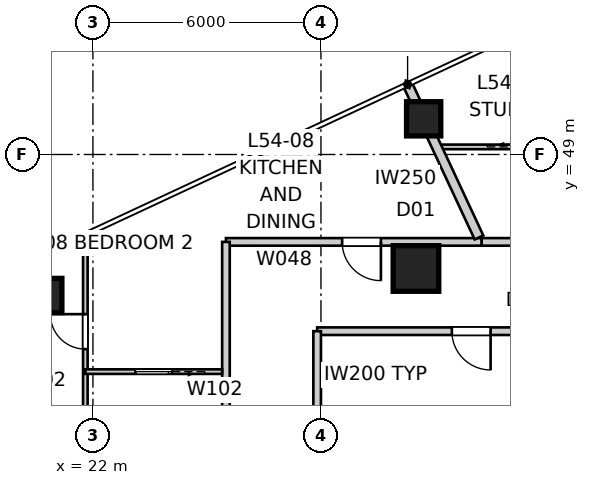
"""IFC4 building model, lengths in metres.
Left out: names, types, materials, properties, quantities, classifications, styles, units other than length and angle.
Written with IfcOpenShell. Run it as: python <this file> out.ifc"""

import sys

from ifc_helpers import new_model, si_unit, direction, frame, frame_2d, origin, origin_2d, place, context, subcontext, project, spatial, rectangle, extrude, element, fill, save


model = new_model("IFC4")
c1 = context("Model", 3, precision=1e-05, world=origin(), true_north=direction((0.0, 1.0)))
c2 = subcontext(c1, "Body", "Model", "MODEL_VIEW")
j1 = project(units=[si_unit("LENGTHUNIT", "METRE"), si_unit("PLANEANGLEUNIT", "RADIAN")], contexts=[c1])
p1 = place(None, origin())
s1 = spatial("IfcSite", under=j1, at=p1, CompositionType="ELEMENT")
p2 = place(p1, origin())
s2 = spatial("IfcBuilding", under=s1, at=p2, CompositionType="ELEMENT")
p3 = place(p2, frame((0.0, 0.0, 196.4)))
s3 = spatial("IfcBuildingStorey", under=s2, at=p3, CompositionType="ELEMENT", Elevation=196.4)
for number, where, z_axis, x_axis in (
    (1, (30.702, 49.939, 0.0), (0.0, 0.0, 1.0), (1.0, 0.0, 0.0)),
    (2, (20.733, 45.29, 0.0), (0.0, 0.0, 1.0), (1.0, 0.0, 0.0)),
):
    element("IfcColumn", number, at=place(p3, frame(where, z_axis=z_axis, x_axis=x_axis)), inside=s3, PredefinedType="COLUMN", context=c2, shape_type="SweptSolid", body=[
        extrude(rectangle(XDim=0.9, YDim=0.9, at=origin_2d()), origin(), (0.0, 0.0, 1.0), 3.4),
    ])
p4 = place(p3, frame((30.5, 46.0, 0.0), z_axis=(0.0, 0.0, 1.0), x_axis=(1.0, 0.0, 0.0)))
e3 = element("IfcColumn", 3, at=p4, inside=s3, PredefinedType="COLUMN", context=c2, shape_type="SweptSolid", body=[
    extrude(rectangle(XDim=1.2, YDim=1.2, at=origin_2d()), origin(), (0.0, 0.0, 1.0), 3.4),
])
p5 = place(p3, frame((33.908, 46.7, 0.0), z_axis=(0.0, 0.0, 1.0), x_axis=(-1.0, 0.0, 0.0)))
e4 = element("IfcWall", 4, at=p5, inside=s3, PredefinedType="PARTITIONING", context=c2, shape_type="SweptSolid", body=[
    extrude(rectangle(XDim=1.684, YDim=0.2, at=frame_2d((0.842, 0.0))), origin(), (0.0, 0.0, 1.0), 2.55),
])
p6 = place(p3, frame((32.225, 46.7, 0.0), z_axis=(0.0, 0.0, 1.0), x_axis=(-1.0, 0.0, 0.0)))
e5 = element("IfcWall", 5, at=p6, inside=s3, PredefinedType="PARTITIONING", context=c2, shape_type="SweptSolid", body=[
    extrude(rectangle(XDim=6.725, YDim=0.2, at=frame_2d((3.362, 0.0))), origin(), (0.0, 0.0, 1.0), 3.25),
])
p7 = place(p6, frame((2.647, 0.0, 0.0)))
e6 = element("IfcOpeningElement", 6, at=p7, cuts=e5, PredefinedType="OPENING", context=c2, shape_type="SweptSolid", body=[
    extrude(rectangle(XDim=1.02, YDim=2.34, at=frame_2d((0.51, 1.17))), frame((0.0, 0.11, 0.0), z_axis=(0.0, -1.0, 0.0), x_axis=(1.0, 0.0, 0.0)), (0.0, 0.0, 1.0), 0.22),
])
p8 = place(p3, frame((25.5, 46.7, 0.0), z_axis=(0.0, 0.0, 1.0), x_axis=(0.0, -1.0, 0.0)))
e7 = element("IfcWall", 7, at=p8, inside=s3, PredefinedType="PARTITIONING", context=c2, shape_type="SweptSolid", body=[
    extrude(rectangle(XDim=33.8, YDim=0.2, at=frame_2d((16.9, 0.0))), origin(), (0.0, 0.0, 1.0), 3.25),
])
p9 = place(p8, frame((15.349, 0.0, 0.0)))
e8 = element("IfcOpeningElement", 8, at=p9, cuts=e7, PredefinedType="OPENING", context=c2, shape_type="SweptSolid", body=[
    extrude(rectangle(XDim=1.02, YDim=2.34, at=frame_2d((0.51, 1.17))), frame((0.0, 0.11, 0.0), z_axis=(0.0, -1.0, 0.0), x_axis=(1.0, 0.0, 0.0)), (0.0, 0.0, 1.0), 0.22),
])
p10 = place(p3, frame((30.28, 50.845, 0.0), z_axis=(0.0, 0.0, 1.0), x_axis=(0.422614816594, -0.906309393527, 0.0)))
e9 = element("IfcWall", 9, at=p10, inside=s3, PredefinedType="PARTITIONING", context=c2, shape_type="SweptSolid", body=[
    extrude(rectangle(XDim=4.445, YDim=0.25, at=frame_2d((2.222, 0.0))), origin(), (0.0, 0.0, 1.0), 3.25),
])
p11 = place(p3, frame((52.1, 44.35, 0.0), z_axis=(0.0, 0.0, 1.0), x_axis=(-1.0, 0.0, 0.0)))
e10 = element("IfcWall", 10, at=p11, inside=s3, PredefinedType="PARTITIONING", context=c2, shape_type="SweptSolid", body=[
    extrude(rectangle(XDim=24.2, YDim=0.2, at=frame_2d((12.1, 0.0))), origin(), (0.0, 0.0, 1.0), 3.25),
])
p12 = place(p11, frame((10.743, 0.0, 0.0)))
e11 = element("IfcOpeningElement", 11, at=p12, cuts=e10, PredefinedType="OPENING", context=c2, shape_type="SweptSolid", body=[
    extrude(rectangle(XDim=1.02, YDim=2.1, at=frame_2d((0.51, 1.05))), frame((0.0, 0.11, 0.0), z_axis=(0.0, -1.0, 0.0), x_axis=(1.0, 0.0, 0.0)), (0.0, 0.0, 1.0), 0.22),
])
p13 = place(p11, frame((19.636, 0.0, 0.0)))
e12 = element("IfcOpeningElement", 12, at=p13, cuts=e10, PredefinedType="OPENING", context=c2, shape_type="SweptSolid", body=[
    extrude(rectangle(XDim=1.02, YDim=2.1, at=frame_2d((0.51, 1.05))), frame((0.0, 0.11, 0.0), z_axis=(0.0, -1.0, 0.0), x_axis=(1.0, 0.0, 0.0)), (0.0, 0.0, 1.0), 0.22),
])
p14 = place(p11, frame((3.297, 0.0, 0.0)))
e13 = element("IfcOpeningElement", 13, at=p14, cuts=e10, PredefinedType="OPENING", context=c2, shape_type="SweptSolid", body=[
    extrude(rectangle(XDim=1.02, YDim=2.1, at=frame_2d((0.51, 1.05))), frame((0.0, 0.11, 0.0), z_axis=(0.0, -1.0, 0.0), x_axis=(1.0, 0.0, 0.0)), (0.0, 0.0, 1.0), 0.22),
])
p15 = place(p3, frame((27.9, 44.35, 0.0), z_axis=(0.0, 0.0, 1.0), x_axis=(0.0, -1.0, 0.0)))
e14 = element("IfcWall", 14, at=p15, inside=s3, PredefinedType="PARTITIONING", context=c2, shape_type="SweptSolid", body=[
    extrude(rectangle(XDim=2.3, YDim=0.2, at=frame_2d((1.15, 0.0))), origin(), (0.0, 0.0, 1.0), 3.25),
])
p16 = place(p3, frame((21.8, 14.647, 0.0), z_axis=(0.0, 0.0, 1.0), x_axis=(0.0, 1.0, 0.0)))
e15 = element("IfcWall", 15, at=p16, inside=s3, PredefinedType="PARTITIONING", context=c2, shape_type="SweptSolid", body=[
    extrude(rectangle(XDim=32.199, YDim=0.12, at=frame_2d((16.1, 0.0))), origin(), (0.0, 0.0, 1.0), 3.25),
])
p17 = place(p16, frame((29.231, 0.0, 0.0)))
e16 = element("IfcOpeningElement", 16, at=p17, cuts=e15, PredefinedType="OPENING", context=c2, shape_type="SweptSolid", body=[
    extrude(rectangle(XDim=0.92, YDim=2.34, at=frame_2d((0.46, 1.17))), frame((0.0, 0.07, 0.0), z_axis=(0.0, -1.0, 0.0), x_axis=(1.0, 0.0, 0.0)), (0.0, 0.0, 1.0), 0.14),
])
p18 = place(p16, frame((14.835, 0.0, 0.0)))
e17 = element("IfcOpeningElement", 17, at=p18, cuts=e15, PredefinedType="OPENING", context=c2, shape_type="SweptSolid", body=[
    extrude(rectangle(XDim=0.92, YDim=2.34, at=frame_2d((0.46, 1.17))), frame((0.0, 0.07, 0.0), z_axis=(0.0, -1.0, 0.0), x_axis=(1.0, 0.0, 0.0)), (0.0, 0.0, 1.0), 0.14),
])
p19 = place(p16, frame((1.041, 0.0, 0.0)))
e18 = element("IfcOpeningElement", 18, at=p19, cuts=e15, PredefinedType="OPENING", context=c2, shape_type="SweptSolid", body=[
    extrude(rectangle(XDim=0.92, YDim=2.1, at=frame_2d((0.46, 1.05))), frame((0.0, 0.07, 0.0), z_axis=(0.0, -1.0, 0.0), x_axis=(1.0, 0.0, 0.0)), (0.0, 0.0, 1.0), 0.14),
])
p20 = place(p16, frame((19.971, 0.0, 0.0)))
e19 = element("IfcOpeningElement", 19, at=p20, cuts=e15, PredefinedType="OPENING", context=c2, shape_type="SweptSolid", body=[
    extrude(rectangle(XDim=0.96, YDim=2.1, at=frame_2d((0.48, 1.05))), frame((0.0, 0.07, 0.0), z_axis=(0.0, -1.0, 0.0), x_axis=(1.0, 0.0, 0.0)), (0.0, 0.0, 1.0), 0.14),
])
p21 = place(p3, frame((31.047, 49.2, 0.0), z_axis=(0.0, 0.0, 1.0), x_axis=(1.0, 0.0, 0.0)))
e20 = element("IfcWall", 20, at=p21, inside=s3, PredefinedType="PARTITIONING", context=c2, shape_type="SweptSolid", body=[
    extrude(rectangle(XDim=25.333, YDim=0.12, at=frame_2d((12.667, 0.0))), origin(), (0.0, 0.0, 1.0), 3.25),
])
p22 = place(p21, frame((14.154, 0.0, 0.0)))
e21 = element("IfcOpeningElement", 21, at=p22, cuts=e20, PredefinedType="OPENING", context=c2, shape_type="SweptSolid", body=[
    extrude(rectangle(XDim=0.92, YDim=2.34, at=frame_2d((0.46, 1.17))), frame((0.0, 0.07, 0.0), z_axis=(0.0, -1.0, 0.0), x_axis=(1.0, 0.0, 0.0)), (0.0, 0.0, 1.0), 0.14),
])
p23 = place(p21, frame((10.24, 0.0, 0.0)))
e22 = element("IfcOpeningElement", 22, at=p23, cuts=e20, PredefinedType="OPENING", context=c2, shape_type="SweptSolid", body=[
    extrude(rectangle(XDim=0.96, YDim=2.1, at=frame_2d((0.48, 1.05))), frame((0.0, 0.07, 0.0), z_axis=(0.0, -1.0, 0.0), x_axis=(1.0, 0.0, 0.0)), (0.0, 0.0, 1.0), 0.14),
])
p24 = place(p21, frame((6.596, 0.0, 0.0)))
e23 = element("IfcOpeningElement", 23, at=p24, cuts=e20, PredefinedType="OPENING", context=c2, shape_type="SweptSolid", body=[
    extrude(rectangle(XDim=0.92, YDim=2.34, at=frame_2d((0.46, 1.17))), frame((0.0, 0.07, 0.0), z_axis=(0.0, -1.0, 0.0), x_axis=(1.0, 0.0, 0.0)), (0.0, 0.0, 1.0), 0.14),
])
p25 = place(p21, frame((2.19, 0.0, 0.0)))
e24 = element("IfcOpeningElement", 24, at=p25, cuts=e20, PredefinedType="OPENING", context=c2, shape_type="SweptSolid", body=[
    extrude(rectangle(XDim=0.96, YDim=2.1, at=frame_2d((0.48, 1.05))), frame((0.0, 0.07, 0.0), z_axis=(0.0, -1.0, 0.0), x_axis=(1.0, 0.0, 0.0)), (0.0, 0.0, 1.0), 0.14),
])
p26 = place(p3, frame((25.4, 43.286, 0.0), z_axis=(0.0, 0.0, 1.0), x_axis=(-1.0, 0.0, 0.0)))
e25 = element("IfcWall", 25, at=p26, inside=s3, PredefinedType="PARTITIONING", context=c2, shape_type="SweptSolid", body=[
    extrude(rectangle(XDim=3.6, YDim=0.12, at=frame_2d((1.8, 0.0))), origin(), (0.0, 0.0, 1.0), 3.25),
])
p27 = place(p26, frame((1.32, 0.0, 0.0)))
e26 = element("IfcOpeningElement", 26, at=p27, cuts=e25, PredefinedType="OPENING", context=c2, shape_type="SweptSolid", body=[
    extrude(rectangle(XDim=0.96, YDim=2.1, at=frame_2d((0.48, 1.05))), frame((0.0, 0.07, 0.0), z_axis=(0.0, -1.0, 0.0), x_axis=(1.0, 0.0, 0.0)), (0.0, 0.0, 1.0), 0.14),
])
p28 = place(p3, frame((17.382, 44.787, 0.0), z_axis=(0.0, 0.0, 1.0), x_axis=(0.422604635972, -0.906314140712, 0.0)))
e27 = element("IfcWall", 27, at=p28, inside=s3, PredefinedType="PARTITIONING", context=c2, shape_type="SweptSolid", body=[
    extrude(rectangle(XDim=8.71, YDim=0.12, at=frame_2d((4.355, 0.0))), origin(), (0.0, 0.0, 1.0), 3.25),
])
p29 = place(p28, frame((3.875, 0.0, 0.0)))
e28 = element("IfcOpeningElement", 28, at=p29, cuts=e27, PredefinedType="OPENING", context=c2, shape_type="SweptSolid", body=[
    extrude(rectangle(XDim=0.92, YDim=2.34, at=frame_2d((0.46, 1.17))), frame((0.0, 0.07, 0.0), z_axis=(0.0, -1.0, 0.0), x_axis=(1.0, 0.0, 0.0)), (0.0, 0.0, 1.0), 0.14),
])
p30 = place(p13, origin())
e29 = element("IfcDoor", 29, at=p30, inside=s3, OperationType="SINGLE_SWING_LEFT", PredefinedType="DOOR", context=c2, shape_type="SweptSolid", body=[
    extrude(rectangle(XDim=1.02, YDim=2.1, at=frame_2d((0.51, 1.05))), frame((0.0, 0.025, 0.0), z_axis=(0.0, -1.0, 0.0), x_axis=(1.0, 0.0, 0.0)), (0.0, 0.0, 1.0), 0.05),
])
fill(e12, e29)
p31 = place(p7, origin())
e30 = element("IfcDoor", 30, at=p31, inside=s3, OperationType="SINGLE_SWING_LEFT", PredefinedType="DOOR", context=c2, shape_type="SweptSolid", body=[
    extrude(rectangle(XDim=1.02, YDim=2.34, at=frame_2d((0.51, 1.17))), frame((0.0, 0.025, 0.0), z_axis=(0.0, -1.0, 0.0), x_axis=(1.0, 0.0, 0.0)), (0.0, 0.0, 1.0), 0.05),
])
fill(e6, e30)
p32 = place(p17, origin())
e31 = element("IfcDoor", 31, at=p32, inside=s3, OperationType="SINGLE_SWING_RIGHT", PredefinedType="DOOR", context=c2, shape_type="SweptSolid", body=[
    extrude(rectangle(XDim=0.92, YDim=2.34, at=frame_2d((0.46, 1.17))), frame((0.0, 0.025, 0.0), z_axis=(0.0, -1.0, 0.0), x_axis=(1.0, 0.0, 0.0)), (0.0, 0.0, 1.0), 0.05),
])
fill(e16, e31)
p33 = place(p27, origin())
e32 = element("IfcDoor", 32, at=p33, inside=s3, OperationType="SLIDING_TO_LEFT", PredefinedType="DOOR", context=c2, shape_type="SweptSolid", body=[
    extrude(rectangle(XDim=0.96, YDim=2.1, at=frame_2d((0.48, 1.05))), frame((0.0, 0.025, 0.0), z_axis=(0.0, -1.0, 0.0), x_axis=(1.0, 0.0, 0.0)), (0.0, 0.0, 1.0), 0.05),
])
fill(e26, e32)
save(model, sys.argv[1])
